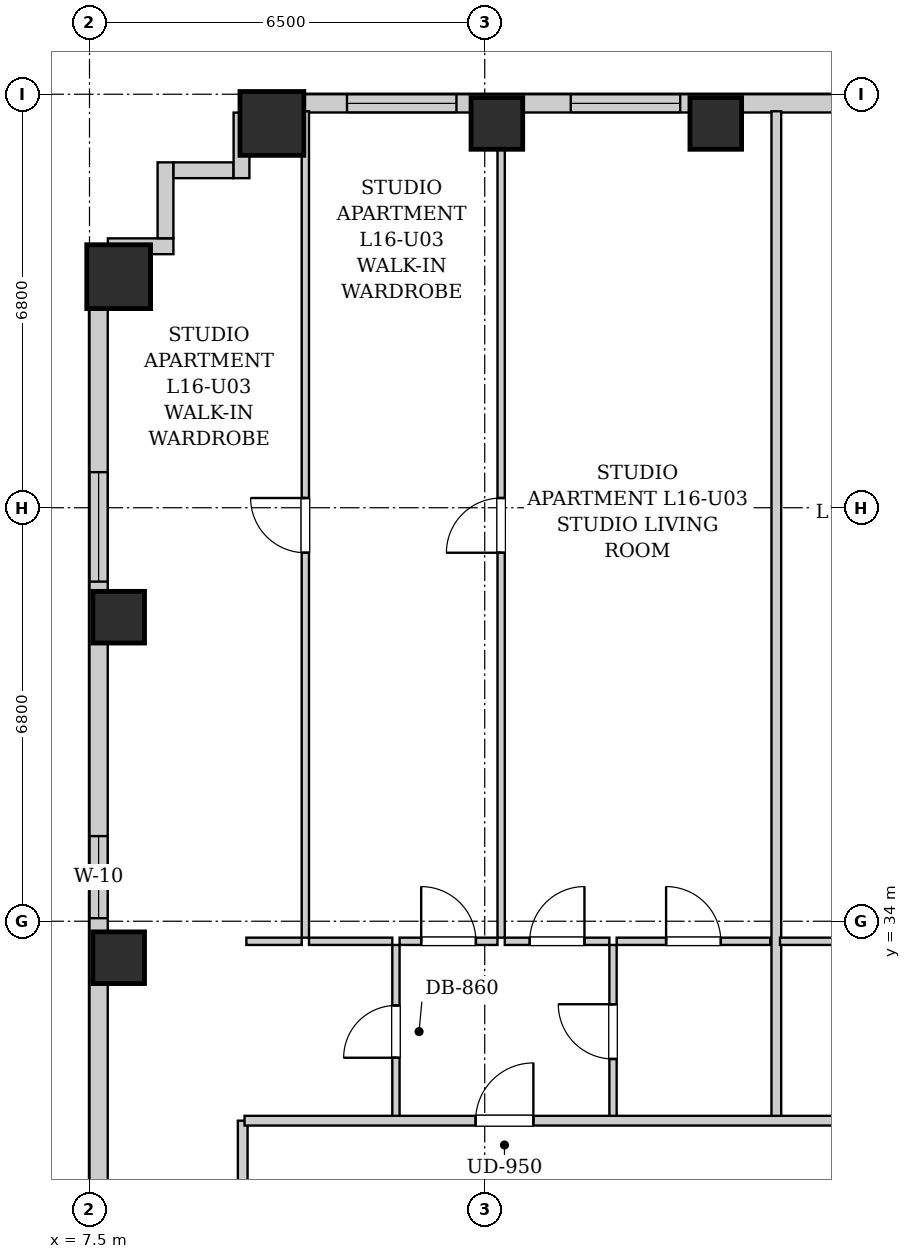
"""IFC4 building model, lengths in metres.
Left out: names, types, materials, properties, quantities, classifications, styles, units other than length and angle.
Written with IfcOpenShell. Run it as: python <this file> out.ifc"""

import sys

from ifc_helpers import new_model, si_unit, direction, frame, frame_2d, origin, origin_2d, place, context, subcontext, project, spatial, rectangle, extrude, element, fill, save


model = new_model("IFC4")
c1 = context("Model", 3, precision=1e-05, world=origin(), true_north=direction((0.0, 1.0)))
c2 = subcontext(c1, "Body", "Model", "MODEL_VIEW")
j1 = project(units=[si_unit("LENGTHUNIT", "METRE"), si_unit("PLANEANGLEUNIT", "RADIAN")], contexts=[c1])
p1 = place(None, origin())
s1 = spatial("IfcSite", under=j1, at=p1, CompositionType="ELEMENT")
p2 = place(p1, origin())
s2 = spatial("IfcBuilding", under=s1, at=p2, CompositionType="ELEMENT")
p3 = place(p2, frame((0.0, 0.0, 61.0)))
s3 = spatial("IfcBuildingStorey", under=s2, at=p3, CompositionType="ELEMENT", Elevation=61.0)
p4 = place(p3, frame((10.5, 47.12, 0.0), z_axis=(0.0, 0.0, 1.0), x_axis=(1.0, 0.0, 0.0)))
e1 = element("IfcColumn", 1, at=p4, inside=s3, PredefinedType="COLUMN", context=c2, shape_type="SweptSolid", body=[
    extrude(rectangle(XDim=1.05, YDim=1.05, at=origin_2d()), origin(), (0.0, 0.0, 1.0), 3.2),
])
for number, where, z_axis, x_axis in (
    (2, (14.2, 47.12, 0.0), (0.0, 0.0, 1.0), (1.0, 0.0, 0.0)),
    (3, (17.8, 47.12, 0.0), (0.0, 0.0, 1.0), (1.0, 0.0, 0.0)),
    (4, (7.98, 33.4, 0.0), (0.0, 0.0, 1.0), (1.0, 0.0, 0.0)),
    (5, (7.98, 39.0, 0.0), (0.0, 0.0, 1.0), (1.0, 0.0, 0.0)),
):
    element("IfcColumn", number, at=place(p3, frame(where, z_axis=z_axis, x_axis=x_axis)), inside=s3, PredefinedType="COLUMN", context=c2, shape_type="SweptSolid", body=[
        extrude(rectangle(XDim=0.85, YDim=0.85, at=origin_2d()), origin(), (0.0, 0.0, 1.0), 3.2),
    ])
p5 = place(p3, frame((7.98, 44.6, 0.0), z_axis=(0.0, 0.0, 1.0), x_axis=(1.0, 0.0, 0.0)))
e6 = element("IfcColumn", 6, at=p5, inside=s3, PredefinedType="COLUMN", context=c2, shape_type="SweptSolid", body=[
    extrude(rectangle(XDim=1.05, YDim=1.05, at=origin_2d()), origin(), (0.0, 0.0, 1.0), 3.2),
])
p6 = place(p3, frame((10.0, 47.45, 0.0), z_axis=(0.0, 0.0, 1.0), x_axis=(1.0, 0.0, 0.0)))
e7 = element("IfcWall", 7, at=p6, inside=s3, PredefinedType="SOLIDWALL", context=c2, shape_type="SweptSolid", body=[
    extrude(rectangle(XDim=26.35, YDim=0.3, at=frame_2d((13.175, 0.0))), origin(), (0.0, 0.0, 1.0), 1.975),
])
p7 = place(p6, frame((1.735, 0.0, 0.55)))
e8 = element("IfcOpeningElement", 8, at=p7, cuts=e7, PredefinedType="OPENING", context=c2, shape_type="SweptSolid", body=[
    extrude(rectangle(XDim=1.8, YDim=1.2, at=frame_2d((0.9, 0.6))), frame((0.0, 0.16, 0.0), z_axis=(0.0, -1.0, 0.0), x_axis=(1.0, 0.0, 0.0)), (0.0, 0.0, 1.0), 0.32),
])
p8 = place(p6, frame((5.415, 0.0, 0.55)))
e9 = element("IfcOpeningElement", 9, at=p8, cuts=e7, PredefinedType="OPENING", context=c2, shape_type="SweptSolid", body=[
    extrude(rectangle(XDim=1.8, YDim=1.2, at=frame_2d((0.9, 0.6))), frame((0.0, 0.16, 0.0), z_axis=(0.0, -1.0, 0.0), x_axis=(1.0, 0.0, 0.0)), (0.0, 0.0, 1.0), 0.32),
])
p9 = place(p6, frame((10.618, 0.0, 0.55)))
e10 = element("IfcOpeningElement", 10, at=p9, cuts=e7, PredefinedType="OPENING", context=c2, shape_type="SweptSolid", body=[
    extrude(rectangle(XDim=1.8, YDim=1.2, at=frame_2d((0.9, 0.6))), frame((0.0, 0.16, 0.0), z_axis=(0.0, -1.0, 0.0), x_axis=(1.0, 0.0, 0.0)), (0.0, 0.0, 1.0), 0.32),
])
p10 = place(p6, frame((17.696, 0.0, 0.55)))
e11 = element("IfcOpeningElement", 11, at=p10, cuts=e7, PredefinedType="OPENING", context=c2, shape_type="SweptSolid", body=[
    extrude(rectangle(XDim=1.8, YDim=1.2, at=frame_2d((0.9, 0.6))), frame((0.0, 0.16, 0.0), z_axis=(0.0, -1.0, 0.0), x_axis=(1.0, 0.0, 0.0)), (0.0, 0.0, 1.0), 0.32),
])
p11 = place(p6, frame((20.815, 0.0, 0.55)))
e12 = element("IfcOpeningElement", 12, at=p11, cuts=e7, PredefinedType="OPENING", context=c2, shape_type="SweptSolid", body=[
    extrude(rectangle(XDim=1.8, YDim=1.2, at=frame_2d((0.9, 0.6))), frame((0.0, 0.16, 0.0), z_axis=(0.0, -1.0, 0.0), x_axis=(1.0, 0.0, 0.0)), (0.0, 0.0, 1.0), 0.32),
])
p12 = place(p6, frame((23.785, 0.0, 0.55)))
e13 = element("IfcOpeningElement", 13, at=p12, cuts=e7, PredefinedType="OPENING", context=c2, shape_type="SweptSolid", body=[
    extrude(rectangle(XDim=1.35, YDim=1.2, at=frame_2d((0.675, 0.6))), frame((0.0, 0.16, 0.0), z_axis=(0.0, -1.0, 0.0), x_axis=(1.0, 0.0, 0.0)), (0.0, 0.0, 1.0), 0.32),
])
p13 = place(p3, frame((7.65, 2.5, 0.0), z_axis=(0.0, 0.0, 1.0), x_axis=(0.0, 1.0, 0.0)))
e14 = element("IfcWall", 14, at=p13, inside=s3, PredefinedType="SOLIDWALL", context=c2, shape_type="SweptSolid", body=[
    extrude(rectangle(XDim=42.6, YDim=0.3, at=frame_2d((21.3, 0.0))), origin(), (0.0, 0.0, 1.0), 1.975),
])
p14 = place(p13, frame((3.15, 0.0, 0.55)))
e15 = element("IfcOpeningElement", 15, at=p14, cuts=e14, PredefinedType="OPENING", context=c2, shape_type="SweptSolid", body=[
    extrude(rectangle(XDim=1.8, YDim=1.2, at=frame_2d((0.9, 0.6))), frame((0.0, 0.16, 0.0), z_axis=(0.0, -1.0, 0.0), x_axis=(1.0, 0.0, 0.0)), (0.0, 0.0, 1.0), 0.32),
])
p15 = place(p13, frame((1.185, 0.0, 0.55)))
e16 = element("IfcOpeningElement", 16, at=p15, cuts=e14, PredefinedType="OPENING", context=c2, shape_type="SweptSolid", body=[
    extrude(rectangle(XDim=1.35, YDim=1.2, at=frame_2d((0.675, 0.6))), frame((0.0, 0.16, 0.0), z_axis=(0.0, -1.0, 0.0), x_axis=(1.0, 0.0, 0.0)), (0.0, 0.0, 1.0), 0.32),
])
p16 = place(p13, frame((37.085, 0.0, 0.55)))
e17 = element("IfcOpeningElement", 17, at=p16, cuts=e14, PredefinedType="OPENING", context=c2, shape_type="SweptSolid", body=[
    extrude(rectangle(XDim=1.8, YDim=1.2, at=frame_2d((0.9, 0.6))), frame((0.0, 0.16, 0.0), z_axis=(0.0, -1.0, 0.0), x_axis=(1.0, 0.0, 0.0)), (0.0, 0.0, 1.0), 0.32),
])
p17 = place(p13, frame((31.55, 0.0, 0.55)))
e18 = element("IfcOpeningElement", 18, at=p17, cuts=e14, PredefinedType="OPENING", context=c2, shape_type="SweptSolid", body=[
    extrude(rectangle(XDim=1.35, YDim=1.2, at=frame_2d((0.675, 0.6))), frame((0.0, 0.16, 0.0), z_axis=(0.0, -1.0, 0.0), x_axis=(1.0, 0.0, 0.0)), (0.0, 0.0, 1.0), 0.32),
])
p18 = place(p13, frame((15.2, 0.0, 0.55)))
e19 = element("IfcOpeningElement", 19, at=p18, cuts=e14, PredefinedType="OPENING", context=c2, shape_type="SweptSolid", body=[
    extrude(rectangle(XDim=1.8, YDim=1.2, at=frame_2d((0.9, 0.6))), frame((0.0, 0.16, 0.0), z_axis=(0.0, -1.0, 0.0), x_axis=(1.0, 0.0, 0.0)), (0.0, 0.0, 1.0), 0.32),
])
p19 = place(p13, frame((13.085, 0.0, 0.55)))
e20 = element("IfcOpeningElement", 20, at=p19, cuts=e14, PredefinedType="OPENING", context=c2, shape_type="SweptSolid", body=[
    extrude(rectangle(XDim=1.35, YDim=1.2, at=frame_2d((0.675, 0.6))), frame((0.0, 0.16, 0.0), z_axis=(0.0, -1.0, 0.0), x_axis=(1.0, 0.0, 0.0)), (0.0, 0.0, 1.0), 0.32),
])
p20 = place(p13, frame((22.575, 0.0, 0.55)))
e21 = element("IfcOpeningElement", 21, at=p20, cuts=e14, PredefinedType="OPENING", context=c2, shape_type="SweptSolid", body=[
    extrude(rectangle(XDim=1.8, YDim=1.2, at=frame_2d((0.9, 0.6))), frame((0.0, 0.16, 0.0), z_axis=(0.0, -1.0, 0.0), x_axis=(1.0, 0.0, 0.0)), (0.0, 0.0, 1.0), 0.32),
])
p21 = place(p3, frame((7.802, 45.1, 0.0), z_axis=(0.0, 0.0, 1.0), x_axis=(1.0, 0.0, 0.0)))
e22 = element("IfcWall", 22, at=p21, inside=s3, PredefinedType="SOLIDWALL", context=c2, shape_type="SweptSolid", body=[
    extrude(rectangle(XDim=1.078, YDim=0.26, at=frame_2d((0.539, 0.0))), origin(), (0.0, 0.0, 1.0), 2.94),
])
p22 = place(p3, frame((8.75, 45.232, 0.0), z_axis=(0.0, 0.0, 1.0), x_axis=(0.0, 1.0, 0.0)))
e23 = element("IfcWall", 23, at=p22, inside=s3, PredefinedType="SOLIDWALL", context=c2, shape_type="SweptSolid", body=[
    extrude(rectangle(XDim=1.248, YDim=0.26, at=frame_2d((0.624, 0.0))), origin(), (0.0, 0.0, 1.0), 2.94),
])
p23 = place(p3, frame((8.882, 46.35, 0.0), z_axis=(0.0, 0.0, 1.0), x_axis=(1.0, 0.0, 0.0)))
e24 = element("IfcWall", 24, at=p23, inside=s3, PredefinedType="SOLIDWALL", context=c2, shape_type="SweptSolid", body=[
    extrude(rectangle(XDim=0.986, YDim=0.26, at=frame_2d((0.493, 0.0))), origin(), (0.0, 0.0, 1.0), 2.94),
])
p24 = place(p3, frame((10.0, 46.22, 0.0), z_axis=(0.0, 0.0, 1.0), x_axis=(0.0, 1.0, 0.0)))
e25 = element("IfcWall", 25, at=p24, inside=s3, PredefinedType="SOLIDWALL", context=c2, shape_type="SweptSolid", body=[
    extrude(rectangle(XDim=1.078, YDim=0.26, at=frame_2d((0.539, 0.0))), origin(), (0.0, 0.0, 1.0), 2.94),
])
p25 = place(p3, frame((10.02, 28.98, 0.0), z_axis=(0.0, 0.0, 1.0), x_axis=(0.0, 1.0, 0.0)))
e26 = element("IfcWall", 26, at=p25, inside=s3, PredefinedType="PARTITIONING", context=c2, shape_type="SweptSolid", body=[
    extrude(rectangle(XDim=1.74, YDim=0.16, at=frame_2d((0.87, 0.0))), origin(), (0.0, 0.0, 1.0), 2.94),
])
p26 = place(p3, frame((12.54, 30.76, 0.0), z_axis=(0.0, 0.0, 1.0), x_axis=(0.0, 1.0, 0.0)))
e27 = element("IfcWall", 27, at=p26, inside=s3, PredefinedType="PARTITIONING", context=c2, shape_type="SweptSolid", body=[
    extrude(rectangle(XDim=2.85, YDim=0.12, at=frame_2d((1.425, 0.0))), origin(), (0.0, 0.0, 1.0), 2.94),
])
p27 = place(p26, frame((0.995, 0.0, 0.0)))
e28 = element("IfcOpeningElement", 28, at=p27, cuts=e27, PredefinedType="OPENING", context=c2, shape_type="SweptSolid", body=[
    extrude(rectangle(XDim=0.86, YDim=2.05, at=frame_2d((0.43, 1.025))), frame((0.0, 0.07, 0.0), z_axis=(0.0, -1.0, 0.0), x_axis=(1.0, 0.0, 0.0)), (0.0, 0.0, 1.0), 0.14),
])
p28 = place(p3, frame((10.08, 33.67, 0.0), z_axis=(0.0, 0.0, 1.0), x_axis=(1.0, 0.0, 0.0)))
e29 = element("IfcWall", 29, at=p28, inside=s3, PredefinedType="PARTITIONING", context=c2, shape_type="SweptSolid", body=[
    extrude(rectangle(XDim=0.91, YDim=0.12, at=frame_2d((0.455, 0.0))), origin(), (0.0, 0.0, 1.0), 2.94),
])
p29 = place(p3, frame((11.11, 33.67, 0.0), z_axis=(0.0, 0.0, 1.0), x_axis=(1.0, 0.0, 0.0)))
e30 = element("IfcWall", 30, at=p29, inside=s3, PredefinedType="PARTITIONING", context=c2, shape_type="SweptSolid", body=[
    extrude(rectangle(XDim=1.37, YDim=0.12, at=frame_2d((0.685, 0.0))), origin(), (0.0, 0.0, 1.0), 2.94),
])
p30 = place(p3, frame((16.11, 30.76, 0.0), z_axis=(0.0, 0.0, 1.0), x_axis=(0.0, 1.0, 0.0)))
e31 = element("IfcWall", 31, at=p30, inside=s3, PredefinedType="PARTITIONING", context=c2, shape_type="SweptSolid", body=[
    extrude(rectangle(XDim=2.85, YDim=0.12, at=frame_2d((1.425, 0.0))), origin(), (0.0, 0.0, 1.0), 2.94),
])
p31 = place(p30, frame((0.975, 0.0, 0.0)))
e32 = element("IfcOpeningElement", 32, at=p31, cuts=e31, PredefinedType="OPENING", context=c2, shape_type="SweptSolid", body=[
    extrude(rectangle(XDim=0.9, YDim=2.05, at=frame_2d((0.45, 1.025))), frame((0.0, 0.07, 0.0), z_axis=(0.0, -1.0, 0.0), x_axis=(1.0, 0.0, 0.0)), (0.0, 0.0, 1.0), 0.14),
])
p32 = place(p3, frame((12.6, 33.67, 0.0), z_axis=(0.0, 0.0, 1.0), x_axis=(1.0, 0.0, 0.0)))
e33 = element("IfcWall", 33, at=p32, inside=s3, PredefinedType="PARTITIONING", context=c2, shape_type="SweptSolid", body=[
    extrude(rectangle(XDim=1.61, YDim=0.12, at=frame_2d((0.805, 0.0))), origin(), (0.0, 0.0, 1.0), 2.94),
])
p33 = place(p32, frame((0.355, 0.0, 0.0)))
e34 = element("IfcOpeningElement", 34, at=p33, cuts=e33, PredefinedType="OPENING", context=c2, shape_type="SweptSolid", body=[
    extrude(rectangle(XDim=0.9, YDim=2.05, at=frame_2d((0.45, 1.025))), frame((0.0, 0.07, 0.0), z_axis=(0.0, -1.0, 0.0), x_axis=(1.0, 0.0, 0.0)), (0.0, 0.0, 1.0), 0.14),
])
p34 = place(p3, frame((14.33, 33.67, 0.0), z_axis=(0.0, 0.0, 1.0), x_axis=(1.0, 0.0, 0.0)))
e35 = element("IfcWall", 35, at=p34, inside=s3, PredefinedType="PARTITIONING", context=c2, shape_type="SweptSolid", body=[
    extrude(rectangle(XDim=1.72, YDim=0.12, at=frame_2d((0.86, 0.0))), origin(), (0.0, 0.0, 1.0), 2.94),
])
p35 = place(p34, frame((0.41, 0.0, 0.0)))
e36 = element("IfcOpeningElement", 36, at=p35, cuts=e35, PredefinedType="OPENING", context=c2, shape_type="SweptSolid", body=[
    extrude(rectangle(XDim=0.9, YDim=2.05, at=frame_2d((0.45, 1.025))), frame((0.0, 0.07, 0.0), z_axis=(0.0, -1.0, 0.0), x_axis=(1.0, 0.0, 0.0)), (0.0, 0.0, 1.0), 0.14),
])
p36 = place(p3, frame((16.17, 33.67, 0.0), z_axis=(0.0, 0.0, 1.0), x_axis=(1.0, 0.0, 0.0)))
e37 = element("IfcWall", 37, at=p36, inside=s3, PredefinedType="PARTITIONING", context=c2, shape_type="SweptSolid", body=[
    extrude(rectangle(XDim=2.526, YDim=0.12, at=frame_2d((1.263, 0.0))), origin(), (0.0, 0.0, 1.0), 2.94),
])
p37 = place(p36, frame((0.813, 0.0, 0.0)))
e38 = element("IfcOpeningElement", 38, at=p37, cuts=e37, PredefinedType="OPENING", context=c2, shape_type="SweptSolid", body=[
    extrude(rectangle(XDim=0.9, YDim=2.05, at=frame_2d((0.45, 1.025))), frame((0.0, 0.07, 0.0), z_axis=(0.0, -1.0, 0.0), x_axis=(1.0, 0.0, 0.0)), (0.0, 0.0, 1.0), 0.14),
])
p38 = place(p3, frame((11.05, 33.73, 0.0), z_axis=(0.0, 0.0, 1.0), x_axis=(0.0, 1.0, 0.0)))
e39 = element("IfcWall", 39, at=p38, inside=s3, PredefinedType="PARTITIONING", context=c2, shape_type="SweptSolid", body=[
    extrude(rectangle(XDim=13.59, YDim=0.12, at=frame_2d((6.795, 0.0))), origin(), (0.0, 0.0, 1.0), 2.94),
])
p39 = place(p38, frame((6.33, 0.0, 0.0)))
e40 = element("IfcOpeningElement", 40, at=p39, cuts=e39, PredefinedType="OPENING", context=c2, shape_type="SweptSolid", body=[
    extrude(rectangle(XDim=0.9, YDim=2.05, at=frame_2d((0.45, 1.025))), frame((0.0, 0.07, 0.0), z_axis=(0.0, -1.0, 0.0), x_axis=(1.0, 0.0, 0.0)), (0.0, 0.0, 1.0), 0.14),
])
p40 = place(p3, frame((14.27, 33.73, 0.0), z_axis=(0.0, 0.0, 1.0), x_axis=(0.0, 1.0, 0.0)))
e41 = element("IfcWall", 41, at=p40, inside=s3, PredefinedType="PARTITIONING", context=c2, shape_type="SweptSolid", body=[
    extrude(rectangle(XDim=13.59, YDim=0.12, at=frame_2d((6.795, 0.0))), origin(), (0.0, 0.0, 1.0), 2.94),
])
p41 = place(p40, frame((6.33, 0.0, 0.0)))
e42 = element("IfcOpeningElement", 42, at=p41, cuts=e41, PredefinedType="OPENING", context=c2, shape_type="SweptSolid", body=[
    extrude(rectangle(XDim=0.9, YDim=2.05, at=frame_2d((0.45, 1.025))), frame((0.0, 0.07, 0.0), z_axis=(0.0, -1.0, 0.0), x_axis=(1.0, 0.0, 0.0)), (0.0, 0.0, 1.0), 0.14),
])
p42 = place(p3, frame((18.796, 30.76, 0.0), z_axis=(0.0, 0.0, 1.0), x_axis=(0.0, 1.0, 0.0)))
e43 = element("IfcWall", 43, at=p42, inside=s3, PredefinedType="PARTITIONING", context=c2, shape_type="SweptSolid", body=[
    extrude(rectangle(XDim=16.56, YDim=0.16, at=frame_2d((8.28, 0.0))), origin(), (0.0, 0.0, 1.0), 2.94),
])
p43 = place(p3, frame((18.856, 33.67, 0.0), z_axis=(0.0, 0.0, 1.0), x_axis=(1.0, 0.0, 0.0)))
e44 = element("IfcWall", 44, at=p43, inside=s3, PredefinedType="PARTITIONING", context=c2, shape_type="SweptSolid", body=[
    extrude(rectangle(XDim=1.85, YDim=0.12, at=frame_2d((0.925, 0.0))), origin(), (0.0, 0.0, 1.0), 2.94),
])
p44 = place(p3, frame((10.05, 30.72, 0.0), z_axis=(0.0, 0.0, 1.0), x_axis=(1.0, 0.0, 0.0)))
e45 = element("IfcWall", 45, at=p44, inside=s3, PredefinedType="PARTITIONING", context=c2, shape_type="SweptSolid", body=[
    extrude(rectangle(XDim=33.9, YDim=0.16, at=frame_2d((16.95, 0.0))), origin(), (0.0, 0.0, 1.0), 2.94),
])
p45 = place(p44, frame((3.8, 0.0, 0.0)))
e46 = element("IfcOpeningElement", 46, at=p45, cuts=e45, PredefinedType="OPENING", context=c2, shape_type="SweptSolid", body=[
    extrude(rectangle(XDim=0.95, YDim=2.1, at=frame_2d((0.475, 1.05))), frame((0.0, 0.09, 0.0), z_axis=(0.0, -1.0, 0.0), x_axis=(1.0, 0.0, 0.0)), (0.0, 0.0, 1.0), 0.18),
])
p46 = place(p44, frame((11.977, 0.0, 0.0)))
e47 = element("IfcOpeningElement", 47, at=p46, cuts=e45, PredefinedType="OPENING", context=c2, shape_type="SweptSolid", body=[
    extrude(rectangle(XDim=0.95, YDim=2.1, at=frame_2d((0.475, 1.05))), frame((0.0, 0.09, 0.0), z_axis=(0.0, -1.0, 0.0), x_axis=(1.0, 0.0, 0.0)), (0.0, 0.0, 1.0), 0.18),
])
p47 = place(p44, frame((18.09, 0.0, 0.0)))
e48 = element("IfcOpeningElement", 48, at=p47, cuts=e45, PredefinedType="OPENING", context=c2, shape_type="SweptSolid", body=[
    extrude(rectangle(XDim=0.95, YDim=2.1, at=frame_2d((0.475, 1.05))), frame((0.0, 0.09, 0.0), z_axis=(0.0, -1.0, 0.0), x_axis=(1.0, 0.0, 0.0)), (0.0, 0.0, 1.0), 0.18),
])
p48 = place(p44, frame((31.525, 0.0, 0.0)))
e49 = element("IfcOpeningElement", 49, at=p48, cuts=e45, PredefinedType="OPENING", context=c2, shape_type="SweptSolid", body=[
    extrude(rectangle(XDim=0.95, YDim=2.1, at=frame_2d((0.475, 1.05))), frame((0.0, 0.09, 0.0), z_axis=(0.0, -1.0, 0.0), x_axis=(1.0, 0.0, 0.0)), (0.0, 0.0, 1.0), 0.18),
])
p49 = place(p27, origin())
e50 = element("IfcDoor", 50, at=p49, inside=s3, OperationType="SINGLE_SWING_LEFT", PredefinedType="DOOR", context=c2, shape_type="SweptSolid", body=[
    extrude(rectangle(XDim=0.86, YDim=2.05, at=frame_2d((0.43, 1.025))), frame((0.0, 0.025, 0.0), z_axis=(0.0, -1.0, 0.0), x_axis=(1.0, 0.0, 0.0)), (0.0, 0.0, 1.0), 0.05),
])
fill(e28, e50)
p50 = place(p31, origin())
e51 = element("IfcDoor", 51, at=p50, inside=s3, OperationType="SINGLE_SWING_RIGHT", PredefinedType="DOOR", context=c2, shape_type="SweptSolid", body=[
    extrude(rectangle(XDim=0.9, YDim=2.05, at=frame_2d((0.45, 1.025))), frame((0.0, 0.025, 0.0), z_axis=(0.0, -1.0, 0.0), x_axis=(1.0, 0.0, 0.0)), (0.0, 0.0, 1.0), 0.05),
])
fill(e32, e51)
p51 = place(p33, origin())
e52 = element("IfcDoor", 52, at=p51, inside=s3, OperationType="SINGLE_SWING_LEFT", PredefinedType="DOOR", context=c2, shape_type="SweptSolid", body=[
    extrude(rectangle(XDim=0.9, YDim=2.05, at=frame_2d((0.45, 1.025))), frame((0.0, 0.025, 0.0), z_axis=(0.0, -1.0, 0.0), x_axis=(1.0, 0.0, 0.0)), (0.0, 0.0, 1.0), 0.05),
])
fill(e34, e52)
p52 = place(p35, origin())
e53 = element("IfcDoor", 53, at=p52, inside=s3, OperationType="SINGLE_SWING_RIGHT", PredefinedType="DOOR", context=c2, shape_type="SweptSolid", body=[
    extrude(rectangle(XDim=0.9, YDim=2.05, at=frame_2d((0.45, 1.025))), frame((0.0, 0.025, 0.0), z_axis=(0.0, -1.0, 0.0), x_axis=(1.0, 0.0, 0.0)), (0.0, 0.0, 1.0), 0.05),
])
fill(e36, e53)
p53 = place(p37, origin())
e54 = element("IfcDoor", 54, at=p53, inside=s3, OperationType="SINGLE_SWING_LEFT", PredefinedType="DOOR", context=c2, shape_type="SweptSolid", body=[
    extrude(rectangle(XDim=0.9, YDim=2.05, at=frame_2d((0.45, 1.025))), frame((0.0, 0.025, 0.0), z_axis=(0.0, -1.0, 0.0), x_axis=(1.0, 0.0, 0.0)), (0.0, 0.0, 1.0), 0.05),
])
fill(e38, e54)
p54 = place(p39, origin())
e55 = element("IfcDoor", 55, at=p54, inside=s3, OperationType="SINGLE_SWING_RIGHT", PredefinedType="DOOR", context=c2, shape_type="SweptSolid", body=[
    extrude(rectangle(XDim=0.9, YDim=2.05, at=frame_2d((0.45, 1.025))), frame((0.0, 0.025, 0.0), z_axis=(0.0, -1.0, 0.0), x_axis=(1.0, 0.0, 0.0)), (0.0, 0.0, 1.0), 0.05),
])
fill(e40, e55)
p55 = place(p41, origin())
e56 = element("IfcDoor", 56, at=p55, inside=s3, OperationType="SINGLE_SWING_LEFT", PredefinedType="DOOR", context=c2, shape_type="SweptSolid", body=[
    extrude(rectangle(XDim=0.9, YDim=2.05, at=frame_2d((0.45, 1.025))), frame((0.0, 0.025, 0.0), z_axis=(0.0, -1.0, 0.0), x_axis=(1.0, 0.0, 0.0)), (0.0, 0.0, 1.0), 0.05),
])
fill(e42, e56)
p56 = place(p45, origin())
e57 = element("IfcDoor", 57, at=p56, inside=s3, OperationType="SINGLE_SWING_RIGHT", PredefinedType="DOOR", context=c2, shape_type="SweptSolid", body=[
    extrude(rectangle(XDim=0.95, YDim=2.1, at=frame_2d((0.475, 1.05))), frame((0.0, 0.025, 0.0), z_axis=(0.0, -1.0, 0.0), x_axis=(1.0, 0.0, 0.0)), (0.0, 0.0, 1.0), 0.05),
])
fill(e46, e57)
p57 = place(p16, origin())
e58 = element("IfcWindow", 58, at=p57, inside=s3, PartitioningType="DOUBLE_PANEL_VERTICAL", PredefinedType="WINDOW", context=c2, shape_type="SweptSolid", body=[
    extrude(rectangle(XDim=1.8, YDim=1.2, at=frame_2d((0.9, 0.6))), frame((0.0, 0.03, 0.0), z_axis=(0.0, -1.0, 0.0), x_axis=(1.0, 0.0, 0.0)), (0.0, 0.0, 1.0), 0.06),
])
fill(e17, e58)
p58 = place(p17, origin())
e59 = element("IfcWindow", 59, at=p58, inside=s3, PartitioningType="SINGLE_PANEL", PredefinedType="WINDOW", context=c2, shape_type="SweptSolid", body=[
    extrude(rectangle(XDim=1.35, YDim=1.2, at=frame_2d((0.675, 0.6))), frame((0.0, 0.03, 0.0), z_axis=(0.0, -1.0, 0.0), x_axis=(1.0, 0.0, 0.0)), (0.0, 0.0, 1.0), 0.06),
])
fill(e18, e59)
p59 = place(p7, origin())
e60 = element("IfcWindow", 60, at=p59, inside=s3, PartitioningType="DOUBLE_PANEL_VERTICAL", PredefinedType="WINDOW", context=c2, shape_type="SweptSolid", body=[
    extrude(rectangle(XDim=1.8, YDim=1.2, at=frame_2d((0.9, 0.6))), frame((0.0, 0.03, 0.0), z_axis=(0.0, -1.0, 0.0), x_axis=(1.0, 0.0, 0.0)), (0.0, 0.0, 1.0), 0.06),
])
fill(e8, e60)
p60 = place(p8, origin())
e61 = element("IfcWindow", 61, at=p60, inside=s3, PartitioningType="DOUBLE_PANEL_VERTICAL", PredefinedType="WINDOW", context=c2, shape_type="SweptSolid", body=[
    extrude(rectangle(XDim=1.8, YDim=1.2, at=frame_2d((0.9, 0.6))), frame((0.0, 0.03, 0.0), z_axis=(0.0, -1.0, 0.0), x_axis=(1.0, 0.0, 0.0)), (0.0, 0.0, 1.0), 0.06),
])
fill(e9, e61)
save(model, sys.argv[1])
